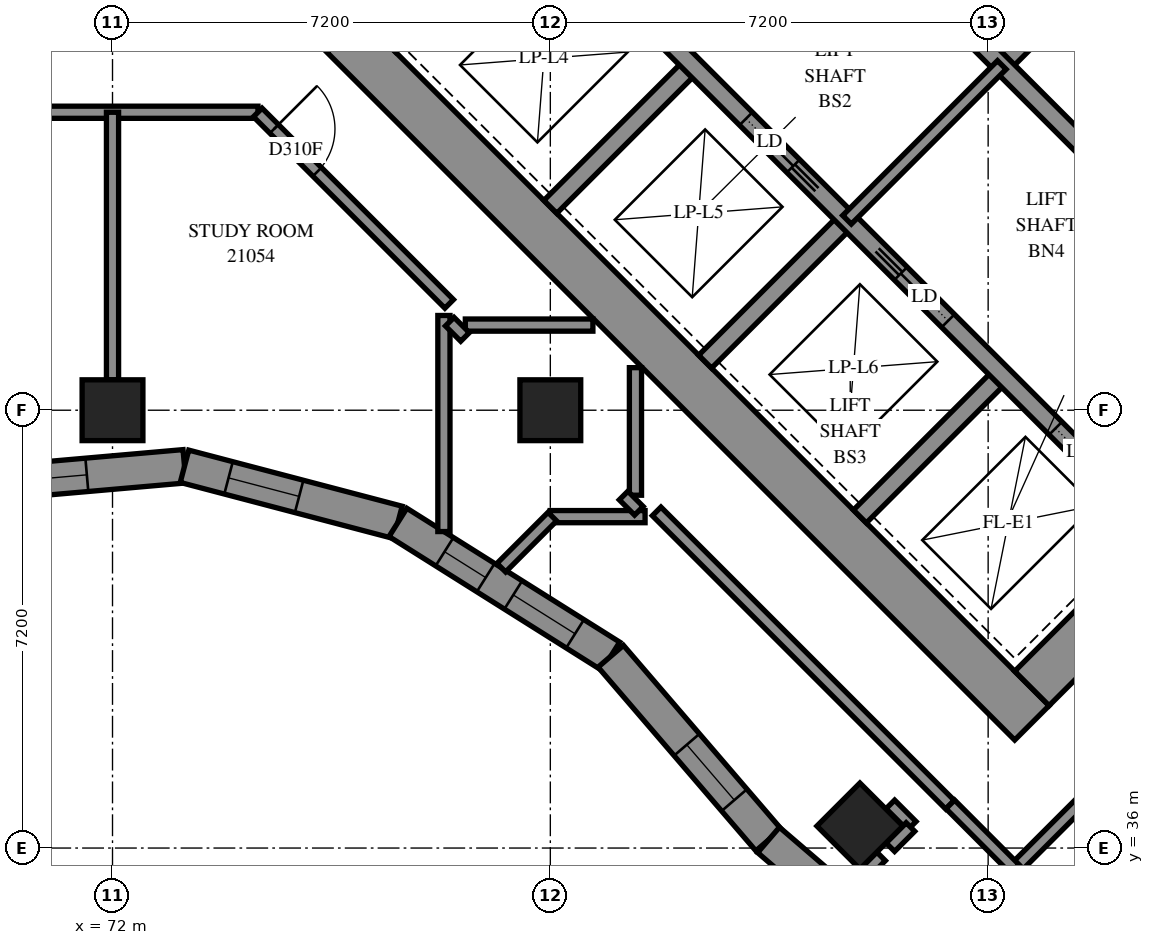
"""IFC4 building model, lengths in metres.
Left out: names, types, materials, properties, quantities, classifications, styles, units other than length and angle.
Written with IfcOpenShell. Run it as: python <this file> out.ifc"""

import sys

from ifc_helpers import new_model, si_unit, direction, frame, frame_2d, origin, origin_2d, place, context, subcontext, project, spatial, polyline, rectangle, outline, extrude, element, fill, save


model = new_model("IFC4")
c1 = context("Model", 3, precision=1e-05, world=origin(), true_north=direction((0.0, 1.0)))
c2 = subcontext(c1, "Body", "Model", "MODEL_VIEW")
j1 = project(units=[si_unit("LENGTHUNIT", "METRE"), si_unit("PLANEANGLEUNIT", "RADIAN")], contexts=[c1])
p1 = place(None, origin())
s1 = spatial("IfcSite", under=j1, at=p1, CompositionType="ELEMENT")
p2 = place(p1, origin())
s2 = spatial("IfcBuilding", under=s1, at=p2, CompositionType="ELEMENT")
p3 = place(p2, frame((0.0, 0.0, 81.2)))
s3 = spatial("IfcBuildingStorey", under=s2, at=p3, CompositionType="ELEMENT", Elevation=81.2)
for number, where, z_axis, x_axis in (
    (1, (72.0, 43.2, 0.0), (0.0, 0.0, 1.0), (1.0, 0.0, 0.0)),
    (2, (79.2, 43.2, 0.0), (0.0, 0.0, 1.0), (1.0, 0.0, 0.0)),
    (3, (84.291, 36.362, 0.0), (0.0, 0.0, 1.0), (0.707, -0.707, 0.0)),
):
    element("IfcColumn", number, at=place(p3, frame(where, z_axis=z_axis, x_axis=x_axis)), inside=s3, PredefinedType="COLUMN", context=c2, shape_type="SweptSolid", body=[
        extrude(rectangle(XDim=1.0, YDim=1.0, at=origin_2d()), origin(), (0.0, 0.0, 1.0), 3.1),
    ])
p4 = place(p3, frame((75.806, 49.373, -0.3), z_axis=(0.0, 0.0, 1.0), x_axis=(0.7071067812, -0.7071067812, 0.0)))
e4 = element("IfcWall", 4, at=p4, inside=s3, PredefinedType="SHEAR", context=c2, shape_type="SweptSolid", body=[
    extrude(rectangle(XDim=16.0, YDim=0.8, at=frame_2d((8.0, 0.0))), origin(), (0.0, 0.0, 1.0), 2.7),
])
p5 = place(p3, frame((86.554, 60.121, -0.3), z_axis=(0.0, 0.0, 1.0), x_axis=(0.7071067812, -0.7071067812, 0.0)))
e5 = element("IfcWall", 5, at=p5, inside=s3, PredefinedType="SHEAR", context=c2, shape_type="SweptSolid", body=[
    extrude(rectangle(XDim=16.0, YDim=0.8, at=frame_2d((8.0, 0.0))), origin(), (0.0, 0.0, 1.0), 2.7),
])
p6 = place(p5, frame((10.8, 0.0, 0.3)))
e6 = element("IfcOpeningElement", 6, at=p6, cuts=e5, PredefinedType="OPENING", context=c2, shape_type="SweptSolid", body=[
    extrude(rectangle(XDim=0.8, YDim=2.1, at=frame_2d((0.4, 1.05))), frame((0.0, 0.41, 0.0), z_axis=(0.0, -1.0, 0.0), x_axis=(1.0, 0.0, 0.0)), (0.0, 0.0, 1.0), 0.82),
])
p7 = place(p3, frame((87.12, 38.625, -0.3), z_axis=(0.0, 0.0, 1.0), x_axis=(0.7071067812, 0.7071067812, 0.0)))
e7 = element("IfcWall", 7, at=p7, inside=s3, PredefinedType="SHEAR", context=c2, shape_type="SweptSolid", body=[
    extrude(rectangle(XDim=14.4, YDim=0.8, at=frame_2d((7.2, 0.0))), origin(), (0.0, 0.0, 1.0), 2.7),
])
p8 = place(p7, frame((4.55, 0.0, 0.3)))
e8 = element("IfcOpeningElement", 8, at=p8, cuts=e7, PredefinedType="OPENING", context=c2, shape_type="SweptSolid", body=[
    extrude(rectangle(XDim=1.1, YDim=2.1, at=frame_2d((0.55, 1.05))), frame((0.0, 0.41, 0.0), z_axis=(0.0, -1.0, 0.0), x_axis=(1.0, 0.0, 0.0)), (0.0, 0.0, 1.0), 0.82),
])
p9 = place(p7, frame((11.35, 0.0, 0.3)))
e9 = element("IfcOpeningElement", 9, at=p9, cuts=e7, PredefinedType="OPENING", context=c2, shape_type="SweptSolid", body=[
    extrude(rectangle(XDim=1.1, YDim=2.1, at=frame_2d((0.55, 1.05))), frame((0.0, 0.41, 0.0), z_axis=(0.0, -1.0, 0.0), x_axis=(1.0, 0.0, 0.0)), (0.0, 0.0, 1.0), 0.82),
])
p10 = place(p3, frame((79.2, 46.544, 0.0), z_axis=(0.0, 0.0, 1.0), x_axis=(0.7071219326, 0.7070916295, 0.0)))
e10 = element("IfcWall", 10, at=p10, inside=s3, PredefinedType="SOLIDWALL", context=c2, shape_type="SweptSolid", body=[
    extrude(rectangle(XDim=3.3, YDim=0.3, at=frame_2d((1.65, 0.0))), origin(), (0.0, 0.0, 1.0), 3.1),
])
p11 = place(p3, frame((81.746, 43.999, 0.0), z_axis=(0.0, 0.0, 1.0), x_axis=(0.7071067812, 0.7071067812, 0.0)))
e11 = element("IfcWall", 11, at=p11, inside=s3, PredefinedType="SOLIDWALL", context=c2, shape_type="SweptSolid", body=[
    extrude(rectangle(XDim=3.3, YDim=0.3, at=frame_2d((1.65, 0.0))), origin(), (0.0, 0.0, 1.0), 3.1),
])
p12 = place(p3, frame((86.625, 48.878, 0.0), z_axis=(0.0, 0.0, 1.0), x_axis=(0.7071067812, 0.7071067812, 0.0)))
e12 = element("IfcWall", 12, at=p12, inside=s3, PredefinedType="SOLIDWALL", context=c2, shape_type="SweptSolid", body=[
    extrude(rectangle(XDim=3.3, YDim=0.3, at=frame_2d((1.65, 0.0))), origin(), (0.0, 0.0, 1.0), 3.1),
])
p13 = place(p3, frame((84.291, 41.453, 0.0), z_axis=(0.0, 0.0, 1.0), x_axis=(0.7071067812, 0.7071067812, 0.0)))
e13 = element("IfcWall", 13, at=p13, inside=s3, PredefinedType="SOLIDWALL", context=c2, shape_type="SweptSolid", body=[
    extrude(rectangle(XDim=3.3, YDim=0.3, at=frame_2d((1.65, 0.0))), origin(), (0.0, 0.0, 1.0), 3.1),
])
p14 = place(p3, frame((78.988, 51.423, 0.0), z_axis=(0.0, 0.0, 1.0), x_axis=(0.7071067812, -0.7071067812, 0.0)))
e14 = element("IfcWall", 14, at=p14, inside=s3, PredefinedType="SOLIDWALL", context=c2, shape_type="SweptSolid", body=[
    extrude(rectangle(XDim=14.4, YDim=0.3, at=frame_2d((7.2, 0.0))), origin(), (0.0, 0.0, 1.0), 3.1),
])
p15 = place(p14, frame((1.25, 0.0, 0.0)))
e15 = element("IfcOpeningElement", 15, at=p15, cuts=e14, PredefinedType="OPENING", context=c2, shape_type="SweptSolid", body=[
    extrude(rectangle(XDim=1.1, YDim=2.1, at=frame_2d((0.55, 1.05))), frame((0.0, 0.16, 0.0), z_axis=(0.0, -1.0, 0.0), x_axis=(1.0, 0.0, 0.0)), (0.0, 0.0, 1.0), 0.32),
])
p16 = place(p14, frame((4.85, 0.0, 0.0)))
e16 = element("IfcOpeningElement", 16, at=p16, cuts=e14, PredefinedType="OPENING", context=c2, shape_type="SweptSolid", body=[
    extrude(rectangle(XDim=1.1, YDim=2.1, at=frame_2d((0.55, 1.05))), frame((0.0, 0.16, 0.0), z_axis=(0.0, -1.0, 0.0), x_axis=(1.0, 0.0, 0.0)), (0.0, 0.0, 1.0), 0.32),
])
p17 = place(p14, frame((8.45, 0.0, 0.0)))
e17 = element("IfcOpeningElement", 17, at=p17, cuts=e14, PredefinedType="OPENING", context=c2, shape_type="SweptSolid", body=[
    extrude(rectangle(XDim=1.1, YDim=2.1, at=frame_2d((0.55, 1.05))), frame((0.0, 0.16, 0.0), z_axis=(0.0, -1.0, 0.0), x_axis=(1.0, 0.0, 0.0)), (0.0, 0.0, 1.0), 0.32),
])
p18 = place(p14, frame((12.05, 0.0, 0.0)))
e18 = element("IfcOpeningElement", 18, at=p18, cuts=e14, PredefinedType="OPENING", context=c2, shape_type="SweptSolid", body=[
    extrude(rectangle(XDim=1.1, YDim=2.1, at=frame_2d((0.55, 1.05))), frame((0.0, 0.16, 0.0), z_axis=(0.0, -1.0, 0.0), x_axis=(1.0, 0.0, 0.0)), (0.0, 0.0, 1.0), 0.32),
])
p19 = place(p3, frame((81.534, 53.969, 0.0), z_axis=(0.0, 0.0, 1.0), x_axis=(0.707103309, -0.7071102534, 0.0)))
e19 = element("IfcWall", 19, at=p19, inside=s3, PredefinedType="SOLIDWALL", context=c2, shape_type="SweptSolid", body=[
    extrude(rectangle(XDim=14.4, YDim=0.3, at=frame_2d((7.2, 0.0))), origin(), (0.0, 0.0, 1.0), 3.1),
])
p20 = place(p19, frame((12.05, 0.0, 0.0)))
e20 = element("IfcOpeningElement", 20, at=p20, cuts=e19, PredefinedType="OPENING", context=c2, shape_type="SweptSolid", body=[
    extrude(rectangle(XDim=1.1, YDim=2.1, at=frame_2d((0.55, 1.05))), frame((0.0, 0.16, 0.0), z_axis=(0.0, -1.0, 0.0), x_axis=(1.0, 0.0, 0.0)), (0.0, 0.0, 1.0), 0.32),
])
p21 = place(p3, frame((69.737, 41.976, 0.0), z_axis=(0.0, 0.0, 1.0), x_axis=(0.9961831061, 0.0872881385, 0.0)))
e21 = element("IfcWall", 21, at=p21, inside=s3, PredefinedType="SOLIDWALL", context=c2, shape_type="SweptSolid", body=[
    extrude(outline(polyline([(-0.024, -0.275), (3.412, -0.275), (3.508, 0.275), (0.024, 0.275), (-0.024, -0.275)])), origin(), (0.0, 0.0, 1.0), 3.1),
])
p22 = place(p21, frame((0.648, 0.0, 0.5)))
e22 = element("IfcOpeningElement", 22, at=p22, cuts=e21, PredefinedType="OPENING", context=c2, shape_type="SweptSolid", body=[
    extrude(rectangle(XDim=1.2, YDim=2.45, at=frame_2d((0.6, 1.225))), frame((0.0, 0.285, 0.0), z_axis=(0.0, -1.0, 0.0), x_axis=(1.0, 0.0, 0.0)), (0.0, 0.0, 1.0), 0.57),
])
p23 = place(p3, frame((73.184, 42.278, 0.0), z_axis=(0.0, 0.0, 1.0), x_axis=(0.967125914, -0.2542979874, 0.0)))
e23 = element("IfcWall", 23, at=p23, inside=s3, PredefinedType="SOLIDWALL", context=c2, shape_type="SweptSolid", body=[
    extrude(outline(polyline([(0.048, -0.275), (3.587, -0.275), (3.671, 0.275), (-0.048, 0.275), (0.048, -0.275)])), origin(), (0.0, 0.0, 1.0), 3.1),
])
p24 = place(p23, frame((0.749, 0.0, 0.5)))
e24 = element("IfcOpeningElement", 24, at=p24, cuts=e23, PredefinedType="OPENING", context=c2, shape_type="SweptSolid", body=[
    extrude(rectangle(XDim=1.2, YDim=2.45, at=frame_2d((0.6, 1.225))), frame((0.0, 0.285, 0.0), z_axis=(0.0, -1.0, 0.0), x_axis=(1.0, 0.0, 0.0)), (0.0, 0.0, 1.0), 0.57),
])
p25 = place(p3, frame((76.694, 41.355, 0.0), z_axis=(0.0, 0.0, 1.0), x_axis=(0.8465222768, -0.532353299, 0.0)))
e25 = element("IfcWall", 25, at=p25, inside=s3, PredefinedType="SOLIDWALL", context=c2, shape_type="SweptSolid", body=[
    extrude(outline(polyline([(0.042, -0.275), (4.093, -0.275), (4.177, 0.275), (-0.042, 0.275), (0.042, -0.275)])), origin(), (0.0, 0.0, 1.0), 3.1),
])
p26 = place(p25, frame((2.241, 0.0, 0.5)))
e26 = element("IfcOpeningElement", 26, at=p26, cuts=e25, PredefinedType="OPENING", context=c2, shape_type="SweptSolid", body=[
    extrude(rectangle(XDim=1.2, YDim=2.45, at=frame_2d((0.6, 1.225))), frame((0.0, 0.285, 0.0), z_axis=(0.0, -1.0, 0.0), x_axis=(1.0, 0.0, 0.0)), (0.0, 0.0, 1.0), 0.57),
])
p27 = place(p25, frame((0.905, 0.0, 0.45)))
e27 = element("IfcOpeningElement", 27, at=p27, cuts=e25, PredefinedType="OPENING", context=c2, shape_type="SweptSolid", body=[
    extrude(rectangle(XDim=0.8, YDim=2.5, at=frame_2d((0.4, 1.25))), frame((0.0, 0.285, 0.0), z_axis=(0.0, -1.0, 0.0), x_axis=(1.0, 0.0, 0.0)), (0.0, 0.0, 1.0), 0.57),
])
p28 = place(p3, frame((80.194, 39.154, 0.0), z_axis=(0.0, 0.0, 1.0), x_axis=(0.6515376316, -0.7586163158, 0.0)))
e28 = element("IfcWall", 28, at=p28, inside=s3, PredefinedType="SOLIDWALL", context=c2, shape_type="SweptSolid", body=[
    extrude(outline(polyline([(0.042, -0.275), (4.003, -0.275), (3.961, 0.275), (-0.042, 0.275), (0.042, -0.275)])), origin(), (0.0, 0.0, 1.0), 3.1),
])
p29 = place(p28, frame((1.918, 0.0, 0.5)))
e29 = element("IfcOpeningElement", 29, at=p29, cuts=e28, PredefinedType="OPENING", context=c2, shape_type="SweptSolid", body=[
    extrude(rectangle(XDim=1.2, YDim=2.45, at=frame_2d((0.6, 1.225))), frame((0.0, 0.285, 0.0), z_axis=(0.0, -1.0, 0.0), x_axis=(1.0, 0.0, 0.0)), (0.0, 0.0, 1.0), 0.57),
])
p30 = place(p3, frame((82.789, 36.133, 0.0), z_axis=(0.0, 0.0, 1.0), x_axis=(0.7586290345, -0.6515228223, 0.0)))
e30 = element("IfcWall", 30, at=p30, inside=s3, PredefinedType="SOLIDWALL", context=c2, shape_type="SweptSolid", body=[
    extrude(outline(polyline([(-0.021, -0.275), (3.941, -0.275), (3.982, 0.275), (0.021, 0.275), (-0.021, -0.275)])), origin(), (0.0, 0.0, 1.0), 3.1),
])
p31 = place(p30, frame((1.732, 0.0, 0.5)))
e31 = element("IfcOpeningElement", 31, at=p31, cuts=e30, PredefinedType="OPENING", context=c2, shape_type="SweptSolid", body=[
    extrude(rectangle(XDim=1.2, YDim=2.45, at=frame_2d((0.6, 1.225))), frame((0.0, 0.285, 0.0), z_axis=(0.0, -1.0, 0.0), x_axis=(1.0, 0.0, 0.0)), (0.0, 0.0, 1.0), 0.57),
])
p32 = place(p3, frame((84.079, 46.332, 0.0), z_axis=(0.0, 0.0, 1.0), x_axis=(0.7071067812, 0.7071067812, 0.0)))
e32 = element("IfcWall", 32, at=p32, inside=s3, PredefinedType="PARTITIONING", context=c2, shape_type="SweptSolid", body=[
    extrude(rectangle(XDim=3.6, YDim=0.2, at=frame_2d((1.8, 0.0))), origin(), (0.0, 0.0, 1.0), 3.1),
])
p33 = place(p3, frame((55.3, 48.1, 0.0), z_axis=(0.0, 0.0, 1.0), x_axis=(1.0, 0.0, 0.0)))
e33 = element("IfcWall", 33, at=p33, inside=s3, PredefinedType="PARTITIONING", context=c2, shape_type="SweptSolid", body=[
    extrude(rectangle(XDim=19.092, YDim=0.2, at=frame_2d((9.546, 0.0))), origin(), (0.0, 0.0, 1.0), 3.1),
])
p34 = place(p33, frame((6.199, 0.0, 0.0)))
e34 = element("IfcOpeningElement", 34, at=p34, cuts=e33, PredefinedType="OPENING", context=c2, shape_type="SweptSolid", body=[
    extrude(rectangle(XDim=0.9, YDim=2.1, at=frame_2d((0.45, 1.05))), frame((0.0, 0.11, 0.0), z_axis=(0.0, -1.0, 0.0), x_axis=(1.0, 0.0, 0.0)), (0.0, 0.0, 1.0), 0.22),
])
p35 = place(p33, frame((13.363, 0.0, 0.0)))
e35 = element("IfcOpeningElement", 35, at=p35, cuts=e33, PredefinedType="OPENING", context=c2, shape_type="SweptSolid", body=[
    extrude(rectangle(XDim=1.0, YDim=2.1, at=frame_2d((0.5, 1.05))), frame((0.0, 0.11, 0.0), z_axis=(0.0, -1.0, 0.0), x_axis=(1.0, 0.0, 0.0)), (0.0, 0.0, 1.0), 0.22),
])
p36 = place(p3, frame((86.835, 35.655, 0.0), z_axis=(0.0, 0.0, 1.0), x_axis=(0.7071067812, 0.7071067812, 0.0)))
e36 = element("IfcWall", 36, at=p36, inside=s3, PredefinedType="PARTITIONING", context=c2, shape_type="SweptSolid", body=[
    extrude(rectangle(XDim=8.451, YDim=0.2, at=frame_2d((4.226, 0.0))), origin(), (0.0, 0.0, 1.0), 3.1),
])
p37 = place(p36, frame((7.192, 0.0, 0.0)))
e37 = element("IfcOpeningElement", 37, at=p37, cuts=e36, PredefinedType="OPENING", context=c2, shape_type="SweptSolid", body=[
    extrude(rectangle(XDim=1.0, YDim=2.1, at=frame_2d((0.5, 1.05))), frame((0.0, 0.11, 0.0), z_axis=(0.0, -1.0, 0.0), x_axis=(1.0, 0.0, 0.0)), (0.0, 0.0, 1.0), 0.22),
])
p38 = place(p3, frame((86.351, 33.325, 0.0), z_axis=(0.0, 0.0, 1.0), x_axis=(0.7069824066, 0.7072311339, 0.0)))
e38 = element("IfcWall", 38, at=p38, inside=s3, PredefinedType="PARTITIONING", context=c2, shape_type="SweptSolid", body=[
    extrude(rectangle(XDim=8.041, YDim=0.2, at=frame_2d((4.021, 0.0))), origin(), (0.0, 0.0, 1.0), 3.1),
])
p39 = place(p3, frame((80.948, 41.536, 0.0), z_axis=(0.0, 0.0, 1.0), x_axis=(0.7071067812, -0.7071067812, 0.0)))
e39 = element("IfcWall", 39, at=p39, inside=s3, PredefinedType="PARTITIONING", context=c2, shape_type="SweptSolid", body=[
    extrude(rectangle(XDim=6.822, YDim=0.2, at=frame_2d((3.411, 0.0))), origin(), (0.0, 0.0, 1.0), 3.1),
])
p40 = place(p3, frame((74.388, 48.096, 0.0), z_axis=(0.0, 0.0, 1.0), x_axis=(0.7071067812, -0.7071067812, 0.0)))
e40 = element("IfcWall", 40, at=p40, inside=s3, PredefinedType="PARTITIONING", context=c2, shape_type="SweptSolid", body=[
    extrude(rectangle(XDim=4.452, YDim=0.2, at=frame_2d((2.226, 0.0))), origin(), (0.0, 0.0, 1.0), 3.1),
])
p41 = place(p40, frame((0.382, 0.0, 0.0)))
e41 = element("IfcOpeningElement", 41, at=p41, cuts=e40, PredefinedType="OPENING", context=c2, shape_type="SweptSolid", body=[
    extrude(rectangle(XDim=1.0, YDim=2.1, at=frame_2d((0.5, 1.05))), frame((0.0, 0.11, 0.0), z_axis=(0.0, -1.0, 0.0), x_axis=(1.0, 0.0, 0.0)), (0.0, 0.0, 1.0), 0.22),
])
p42 = place(p3, frame((72.0, 43.7, 0.0), z_axis=(0.0, 0.0, 1.0), x_axis=(0.0, 1.0, 0.0)))
e42 = element("IfcWall", 42, at=p42, inside=s3, PredefinedType="PARTITIONING", context=c2, shape_type="SweptSolid", body=[
    extrude(rectangle(XDim=4.4, YDim=0.2, at=frame_2d((2.2, 0.0))), origin(), (0.0, 0.0, 1.0), 3.1),
])
p43 = place(p3, frame((77.45, 41.205, 0.0), z_axis=(0.0, 0.0, 1.0), x_axis=(0.0, 1.0, 0.0)))
e43 = element("IfcWall", 43, at=p43, inside=s3, PredefinedType="PARTITIONING", context=c2, shape_type="SweptSolid", body=[
    extrude(rectangle(XDim=3.553, YDim=0.2, at=frame_2d((1.777, 0.0))), origin(), (0.0, 0.0, 1.0), 3.1),
])
for number, where, z_axis, x_axis in (
    (44, (77.802, 44.6, 0.0), (0.0, 0.0, 1.0), (1.0, 0.0, 0.0)),
    (45, (80.6, 41.802, 0.0), (0.0, 0.0, 1.0), (0.0, 1.0, 0.0)),
):
    element("IfcWall", number, at=place(p3, frame(where, z_axis=z_axis, x_axis=x_axis)), inside=s3, PredefinedType="PARTITIONING", context=c2, shape_type="SweptSolid", body=[
        extrude(rectangle(XDim=2.098, YDim=0.2, at=frame_2d((1.049, 0.0))), origin(), (0.0, 0.0, 1.0), 3.1),
    ])
p44 = place(p3, frame((79.198, 41.45, 0.0), z_axis=(0.0, 0.0, 1.0), x_axis=(1.0, 0.0, 0.0)))
e46 = element("IfcWall", 46, at=p44, inside=s3, PredefinedType="PARTITIONING", context=c2, shape_type="SweptSolid", body=[
    extrude(rectangle(XDim=1.56, YDim=0.2, at=frame_2d((0.78, 0.0))), origin(), (0.0, 0.0, 1.0), 3.1),
])
p45 = place(p3, frame((85.778, 36.718, 0.0), z_axis=(0.0, 0.0, 1.0), x_axis=(0.7064400143, -0.70777292, 0.0)))
e47 = element("IfcWall", 47, at=p45, inside=s3, PredefinedType="PARTITIONING", context=c2, shape_type="SweptSolid", body=[
    extrude(rectangle(XDim=1.5, YDim=0.2, at=frame_2d((0.75, 0.0))), origin(), (0.0, 0.0, 1.0), 3.1),
])
p46 = place(p3, frame((78.394, 40.611, 0.0), z_axis=(0.0, 0.0, 1.0), x_axis=(0.7071489173, 0.7070646426, 0.0)))
e48 = element("IfcWall", 48, at=p46, inside=s3, PredefinedType="PARTITIONING", context=c2, shape_type="SweptSolid", body=[
    extrude(rectangle(XDim=1.187, YDim=0.2, at=frame_2d((0.593, 0.0))), origin(), (0.0, 0.0, 1.0), 3.1),
])
p47 = place(p3, frame((84.124, 35.348, 0.0), z_axis=(0.0, 0.0, 1.0), x_axis=(0.7071067812, 0.7071067812, 0.0)))
e49 = element("IfcWall", 49, at=p47, inside=s3, PredefinedType="PARTITIONING", context=c2, shape_type="SweptSolid", body=[
    extrude(rectangle(XDim=0.728, YDim=0.2, at=frame_2d((0.364, 0.0))), origin(), (0.0, 0.0, 1.0), 3.1),
])
p48 = place(p3, frame((84.792, 36.718, 0.0), z_axis=(0.0, 0.0, 1.0), x_axis=(0.7071067812, -0.7071067812, 0.0)))
e50 = element("IfcWall", 50, at=p48, inside=s3, PredefinedType="PARTITIONING", context=c2, shape_type="SweptSolid", body=[
    extrude(rectangle(XDim=0.498, YDim=0.2, at=frame_2d((0.249, 0.0))), origin(), (0.0, 0.0, 1.0), 3.1),
])
p49 = place(p3, frame((84.791, 36.015, 0.0), z_axis=(0.0, 0.0, 1.0), x_axis=(0.7071067812, 0.7071067812, 0.0)))
e51 = element("IfcWall", 51, at=p49, inside=s3, PredefinedType="PARTITIONING", context=c2, shape_type="SweptSolid", body=[
    extrude(rectangle(XDim=0.468, YDim=0.2, at=frame_2d((0.234, 0.0))), origin(), (0.0, 0.0, 1.0), 3.1),
])
for number, where, z_axis, x_axis in (
    (52, (77.546, 44.656, 0.0), (0.0, 0.0, 1.0), (0.707, -0.707, 0.0)),
    (53, (80.405, 41.797, 0.0), (0.0, 0.0, 1.0), (0.707, -0.707, 0.0)),
):
    element("IfcWall", number, at=place(p3, frame(where, z_axis=z_axis, x_axis=x_axis)), inside=s3, PredefinedType="PARTITIONING", context=c2, shape_type="SweptSolid", body=[
        extrude(rectangle(XDim=0.355, YDim=0.2, at=frame_2d((0.177, 0.0))), origin(), (0.0, 0.0, 1.0), 3.1),
    ])
p50 = place(p22, origin())
e54 = element("IfcWindow", 54, at=p50, inside=s3, PartitioningType="SINGLE_PANEL", PredefinedType="WINDOW", context=c2, shape_type="SweptSolid", body=[
    extrude(rectangle(XDim=1.2, YDim=2.45, at=frame_2d((0.6, 1.225))), frame((0.0, 0.155, 0.0), z_axis=(0.0, -1.0, 0.0), x_axis=(1.0, 0.0, 0.0)), (0.0, 0.0, 1.0), 0.06),
])
fill(e22, e54)
p51 = place(p24, origin())
e55 = element("IfcWindow", 55, at=p51, inside=s3, PartitioningType="SINGLE_PANEL", PredefinedType="WINDOW", context=c2, shape_type="SweptSolid", body=[
    extrude(rectangle(XDim=1.2, YDim=2.45, at=frame_2d((0.6, 1.225))), frame((0.0, 0.155, 0.0), z_axis=(0.0, -1.0, 0.0), x_axis=(1.0, 0.0, 0.0)), (0.0, 0.0, 1.0), 0.06),
])
fill(e24, e55)
p52 = place(p26, origin())
e56 = element("IfcWindow", 56, at=p52, inside=s3, PartitioningType="SINGLE_PANEL", PredefinedType="WINDOW", context=c2, shape_type="SweptSolid", body=[
    extrude(rectangle(XDim=1.2, YDim=2.45, at=frame_2d((0.6, 1.225))), frame((0.0, 0.155, 0.0), z_axis=(0.0, -1.0, 0.0), x_axis=(1.0, 0.0, 0.0)), (0.0, 0.0, 1.0), 0.06),
])
fill(e26, e56)
p53 = place(p29, origin())
e57 = element("IfcWindow", 57, at=p53, inside=s3, PartitioningType="SINGLE_PANEL", PredefinedType="WINDOW", context=c2, shape_type="SweptSolid", body=[
    extrude(rectangle(XDim=1.2, YDim=2.45, at=frame_2d((0.6, 1.225))), frame((0.0, 0.155, 0.0), z_axis=(0.0, -1.0, 0.0), x_axis=(1.0, 0.0, 0.0)), (0.0, 0.0, 1.0), 0.06),
])
fill(e29, e57)
p54 = place(p16, origin())
e58 = element("IfcDoor", 58, at=p54, inside=s3, OperationType="SLIDING_TO_RIGHT", PredefinedType="DOOR", context=c2, shape_type="SweptSolid", body=[
    extrude(rectangle(XDim=1.1, YDim=2.1, at=frame_2d((0.55, 1.05))), frame((0.0, 0.025, 0.0), z_axis=(0.0, -1.0, 0.0), x_axis=(1.0, 0.0, 0.0)), (0.0, 0.0, 1.0), 0.05),
])
fill(e16, e58)
p55 = place(p17, origin())
e59 = element("IfcDoor", 59, at=p55, inside=s3, OperationType="SLIDING_TO_LEFT", PredefinedType="DOOR", context=c2, shape_type="SweptSolid", body=[
    extrude(rectangle(XDim=1.1, YDim=2.1, at=frame_2d((0.55, 1.05))), frame((0.0, 0.025, 0.0), z_axis=(0.0, -1.0, 0.0), x_axis=(1.0, 0.0, 0.0)), (0.0, 0.0, 1.0), 0.05),
])
fill(e17, e59)
p56 = place(p18, origin())
e60 = element("IfcDoor", 60, at=p56, inside=s3, OperationType="SLIDING_TO_RIGHT", PredefinedType="DOOR", context=c2, shape_type="SweptSolid", body=[
    extrude(rectangle(XDim=1.1, YDim=2.1, at=frame_2d((0.55, 1.05))), frame((0.0, 0.025, 0.0), z_axis=(0.0, -1.0, 0.0), x_axis=(1.0, 0.0, 0.0)), (0.0, 0.0, 1.0), 0.05),
])
fill(e18, e60)
p57 = place(p41, origin())
e61 = element("IfcDoor", 61, at=p57, inside=s3, OperationType="SINGLE_SWING_LEFT", PredefinedType="DOOR", context=c2, shape_type="SweptSolid", body=[
    extrude(rectangle(XDim=1.0, YDim=2.1, at=frame_2d((0.5, 1.05))), frame((0.0, 0.025, 0.0), z_axis=(0.0, -1.0, 0.0), x_axis=(1.0, 0.0, 0.0)), (0.0, 0.0, 1.0), 0.05),
])
fill(e41, e61)
p58 = place(p27, origin())
e62 = element("IfcWindow", 62, at=p58, inside=s3, PartitioningType="SINGLE_PANEL", PredefinedType="WINDOW", context=c2, shape_type="SweptSolid", body=[
    extrude(rectangle(XDim=0.8, YDim=2.5, at=frame_2d((0.4, 1.25))), frame((0.0, 0.155, 0.0), z_axis=(0.0, -1.0, 0.0), x_axis=(1.0, 0.0, 0.0)), (0.0, 0.0, 1.0), 0.06),
])
fill(e27, e62)
save(model, sys.argv[1])
